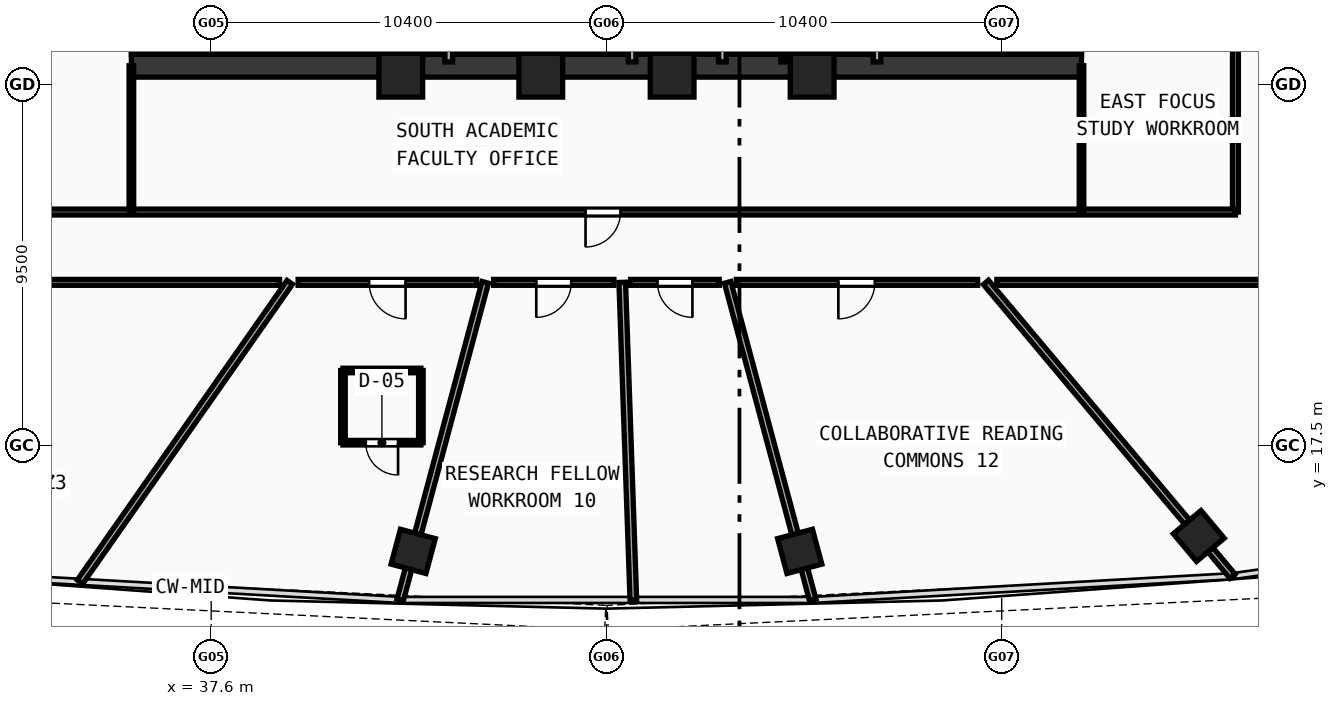
"""IFC4 building model, lengths in metres.
Left out: names, types, materials, properties, quantities, classifications, styles, units other than length and angle.
Written with IfcOpenShell. Run it as: python <this file> out.ifc"""

import sys

from ifc_helpers import new_model, si_unit, direction, frame, frame_2d, origin, origin_with_axes, origin_2d, place, context, subcontext, project, spatial, rectangle, hollow_rectangle, extrude, source, transform, mapped, element, fill, save


model = new_model("IFC4")
c1 = context("Model", 3, precision=1e-05, world=origin(), true_north=direction((0.0, 1.0)))
c2 = subcontext(c1, "Body", "Model", "MODEL_VIEW")
j1 = project(units=[si_unit("LENGTHUNIT", "METRE"), si_unit("PLANEANGLEUNIT", "RADIAN")], contexts=[c1])
p1 = place(None, origin())
s1 = spatial("IfcSite", under=j1, at=p1, CompositionType="ELEMENT")
p2 = place(p1, origin())
s2 = spatial("IfcBuilding", under=s1, at=p2, CompositionType="ELEMENT")
p3 = place(p2, frame((0.0, 0.0, 155.59)))
s3 = spatial("IfcBuildingStorey", under=s2, at=p3, CompositionType="ELEMENT", Elevation=155.59)
p4 = place(p3, frame((35.5, 27.5, 0.0), z_axis=(0.0, 0.0, 1.0), x_axis=(1.0, 0.0, 0.0)))
e1 = element("IfcWall", 1, at=p4, inside=s3, PredefinedType="SHEAR", context=c2, shape_type="SweptSolid", body=[
    extrude(rectangle(XDim=25.0, YDim=0.6, at=frame_2d((12.5, 0.0))), origin(), (0.0, 0.0, 1.0), 3.42),
])
for number, where, z_axis, x_axis in (
    (2, (35.8, 27.8, 0.0), (0.0, 0.0, 1.0), (0.0, 1.0, 0.0)),
    (3, (60.2, 27.8, 0.0), (0.0, 0.0, 1.0), (0.0, 1.0, 0.0)),
):
    element("IfcWall", number, at=place(p3, frame(where, z_axis=z_axis, x_axis=x_axis)), inside=s3, PredefinedType="SHEAR", context=c2, shape_type="SweptSolid", body=[
        extrude(rectangle(XDim=12.1, YDim=0.6, at=frame_2d((6.05, 0.0))), origin(), (0.0, 0.0, 1.0), 3.42),
    ])
p5 = place(p3, frame((39.4, 27.8, 0.0), z_axis=(0.0, 0.0, 1.0), x_axis=(0.0, 1.0, 0.0)))
e4 = element("IfcWall", 4, at=p5, inside=s3, PredefinedType="SHEAR", context=c2, shape_type="SweptSolid", body=[
    extrude(rectangle(XDim=12.1, YDim=0.4, at=frame_2d((6.05, 0.0))), origin(), (0.0, 0.0, 1.0), 3.42),
])
p6 = place(p5, frame((9.95, 0.0, 0.0)))
e5 = element("IfcOpeningElement", 5, at=p6, cuts=e4, PredefinedType="OPENING", context=c2, shape_type="SweptSolid", body=[
    extrude(rectangle(XDim=1.1, YDim=2.1, at=frame_2d((0.55, 1.05))), frame((0.0, 0.21, 0.0), z_axis=(0.0, -1.0, 0.0), x_axis=(1.0, 0.0, 0.0)), (0.0, 0.0, 1.0), 0.42),
])
p7 = place(p3, frame((56.6, 27.8, 0.0), z_axis=(0.0, 0.0, 1.0), x_axis=(0.0, 1.0, 0.0)))
e6 = element("IfcWall", 6, at=p7, inside=s3, PredefinedType="SHEAR", context=c2, shape_type="SweptSolid", body=[
    extrude(rectangle(XDim=12.1, YDim=0.4, at=frame_2d((6.05, 0.0))), origin(), (0.0, 0.0, 1.0), 3.42),
])
p8 = place(p7, frame((9.95, 0.0, 0.0)))
e7 = element("IfcOpeningElement", 7, at=p8, cuts=e6, PredefinedType="OPENING", context=c2, shape_type="SweptSolid", body=[
    extrude(rectangle(XDim=1.1, YDim=2.1, at=frame_2d((0.55, 1.05))), frame((0.0, 0.21, 0.0), z_axis=(0.0, -1.0, 0.0), x_axis=(1.0, 0.0, 0.0)), (0.0, 0.0, 1.0), 0.42),
])
m1 = source(origin(), c2, "Body", "SweptSolid", [
    extrude(hollow_rectangle(XDim=1.15, YDim=1.15, WallThickness=0.048, at=origin_2d()), origin(), (0.0, 0.0, 1.0), 3.68),
])
for number, where, z_axis, x_axis in (
    (8, (42.588, 27.25, -0.26), (0.0, 0.0, 1.0), (1.0, 0.0, 0.0)),
    (9, (46.272, 27.25, -0.26), (0.0, 0.0, 1.0), (1.0, 0.0, 0.0)),
    (10, (49.729, 27.25, -0.26), (0.0, 0.0, 1.0), (1.0, 0.0, 0.0)),
    (11, (53.412, 27.25, -0.26), (0.0, 0.0, 1.0), (1.0, 0.0, 0.0)),
):
    element("IfcColumn", number, at=place(p3, frame(where, z_axis=z_axis, x_axis=x_axis)), inside=s3, PredefinedType="COLUMN", context=c2, shape_type="MappedRepresentation", body=[
        mapped(m1, transform((0.0, 0.0, 0.0), scale=1.0)),
    ])
m2 = source(origin(), c2, "Body", "SweptSolid", [
    extrude(hollow_rectangle(XDim=0.95, YDim=0.95, WallThickness=0.04, at=origin_2d()), origin(), (0.0, 0.0, 1.0), 3.68),
])
for number, where, z_axis, x_axis in (
    (12, (42.915, 14.722, -0.26), (0.0, 0.0, 1.0), (0.966, -0.259, 0.0)),
    (13, (53.085, 14.722, -0.26), (0.0, 0.0, 1.0), (0.966, 0.259, 0.0)),
    (14, (63.585, 15.126, -0.26), (0.0, 0.0, 1.0), (0.766, 0.643, 0.0)),
):
    element("IfcColumn", number, at=place(p3, frame(where, z_axis=z_axis, x_axis=x_axis)), inside=s3, PredefinedType="COLUMN", context=c2, shape_type="MappedRepresentation", body=[
        mapped(m2, transform((0.0, 0.0, 0.0), scale=1.0)),
    ])
p9 = place(p3, frame((43.85, 27.6, 0.0), z_axis=(0.0, 0.0, 1.0), x_axis=(0.0, 1.0, 0.0)))
e15 = element("IfcWall", 15, at=p9, inside=s3, PredefinedType="SOLIDWALL", context=c2, shape_type="SweptSolid", body=[
    extrude(rectangle(XDim=6.22, YDim=0.2, at=frame_2d((3.11, 0.0))), origin(), (0.0, 0.0, 1.0), 3.42),
])
p10 = place(p9, frame((2.25, 0.0, 0.0)))
e16 = element("IfcOpeningElement", 16, at=p10, cuts=e15, PredefinedType="OPENING", context=c2, shape_type="SweptSolid", body=[
    extrude(rectangle(XDim=1.05, YDim=2.1, at=frame_2d((0.525, 1.05))), frame((0.0, 0.11, 0.0), z_axis=(0.0, -1.0, 0.0), x_axis=(1.0, 0.0, 0.0)), (0.0, 0.0, 1.0), 0.22),
])
p11 = place(p3, frame((53.68, 27.6, 0.0), z_axis=(0.0, 0.0, 1.0), x_axis=(0.0, 1.0, 0.0)))
e17 = element("IfcWall", 17, at=p11, inside=s3, PredefinedType="SOLIDWALL", context=c2, shape_type="SweptSolid", body=[
    extrude(rectangle(XDim=9.05, YDim=0.2, at=frame_2d((4.525, 0.0))), origin(), (0.0, 0.0, 1.0), 3.42),
])
p12 = place(p11, frame((6.9, 0.0, 0.0)))
e18 = element("IfcOpeningElement", 18, at=p12, cuts=e17, PredefinedType="OPENING", context=c2, shape_type="SweptSolid", body=[
    extrude(rectangle(XDim=1.05, YDim=2.1, at=frame_2d((0.525, 1.05))), frame((0.0, 0.11, 0.0), z_axis=(0.0, -1.0, 0.0), x_axis=(1.0, 0.0, 0.0)), (0.0, 0.0, 1.0), 0.22),
])
for number, where, z_axis, x_axis in (
    (19, (51.05, 27.6, 0.0), (0.0, 0.0, 1.0), (0.0, 1.0, 0.0)),
    (20, (46.225, 27.6, 0.0), (0.0, 0.0, 1.0), (0.0, 1.0, 0.0)),
    (21, (48.675, 27.6, 0.0), (0.0, 0.0, 1.0), (0.0, 1.0, 0.0)),
    (22, (55.12, 27.6, 0.0), (0.0, 0.0, 1.0), (0.0, 1.0, 0.0)),
):
    element("IfcWall", number, at=place(p3, frame(where, z_axis=z_axis, x_axis=x_axis)), inside=s3, PredefinedType="SOLIDWALL", context=c2, shape_type="SweptSolid", body=[
        extrude(rectangle(XDim=2.12, YDim=0.2, at=frame_2d((1.06, 0.0))), origin(), (0.0, 0.0, 1.0), 3.42),
    ])
p13 = place(p3, frame((42.32, 27.6, 0.0), z_axis=(0.0, 0.0, 1.0), x_axis=(0.0, 1.0, 0.0)))
e23 = element("IfcWall", 23, at=p13, inside=s3, PredefinedType="PARTITIONING", context=c2, shape_type="SweptSolid", body=[
    extrude(rectangle(XDim=5.9, YDim=0.155, at=frame_2d((2.95, 0.0))), origin(), (0.0, 0.0, 1.0), 3.42),
])
p14 = place(p13, frame((1.4, 0.0, 0.0)))
e24 = element("IfcOpeningElement", 24, at=p14, cuts=e23, PredefinedType="OPENING", context=c2, shape_type="SweptSolid", body=[
    extrude(rectangle(XDim=0.9, YDim=2.1, at=frame_2d((0.45, 1.05))), frame((0.0, 0.087, 0.0), z_axis=(0.0, -1.0, 0.0), x_axis=(1.0, 0.0, 0.0)), (0.0, 0.0, 1.0), 0.175),
])
p15 = place(p13, frame((4.45, 0.0, 0.0)))
e25 = element("IfcOpeningElement", 25, at=p15, cuts=e23, PredefinedType="OPENING", context=c2, shape_type="SweptSolid", body=[
    extrude(rectangle(XDim=0.9, YDim=2.1, at=frame_2d((0.45, 1.05))), frame((0.0, 0.087, 0.0), z_axis=(0.0, -1.0, 0.0), x_axis=(1.0, 0.0, 0.0)), (0.0, 0.0, 1.0), 0.175),
])
p16 = place(p3, frame((52.65, 27.6, 0.0), z_axis=(0.0, 0.0, 1.0), x_axis=(0.0, 1.0, 0.0)))
e26 = element("IfcWall", 26, at=p16, inside=s3, PredefinedType="PARTITIONING", context=c2, shape_type="SweptSolid", body=[
    extrude(rectangle(XDim=2.12, YDim=0.12, at=frame_2d((1.06, 0.0))), origin(), (0.0, 0.0, 1.0), 3.42),
])
p17 = place(p3, frame((64.55, 23.65, 0.0), z_axis=(0.0, 0.0, 1.0), x_axis=(0.0, 1.0, 0.0)))
e27 = element("IfcWall", 27, at=p17, inside=s3, PredefinedType="PARTITIONING", context=c2, shape_type="SweptSolid", body=[
    extrude(rectangle(XDim=16.6, YDim=0.155, at=frame_2d((8.3, 0.0))), origin(), (0.0, 0.0, 1.0), 2.77),
])
p18 = place(p17, frame((7.5, 0.0, 0.0)))
e28 = element("IfcOpeningElement", 28, at=p18, cuts=e27, PredefinedType="OPENING", context=c2, shape_type="SweptSolid", body=[
    extrude(rectangle(XDim=0.9, YDim=2.08, at=frame_2d((0.45, 1.04))), frame((0.0, 0.087, 0.0), z_axis=(0.0, -1.0, 0.0), x_axis=(1.0, 0.0, 0.0)), (0.0, 0.0, 1.0), 0.175),
])
p19 = place(p3, frame((31.45, 23.65, 0.0), z_axis=(0.0, 0.0, 1.0), x_axis=(1.0, 0.0, 0.0)))
e29 = element("IfcWall", 29, at=p19, inside=s3, PredefinedType="PARTITIONING", context=c2, shape_type="SweptSolid", body=[
    extrude(rectangle(XDim=33.1, YDim=0.155, at=frame_2d((16.55, 0.0))), origin(), (0.0, 0.0, 1.0), 2.77),
])
p20 = place(p19, frame((16.0, 0.0, 0.0)))
e30 = element("IfcOpeningElement", 30, at=p20, cuts=e29, PredefinedType="OPENING", context=c2, shape_type="SweptSolid", body=[
    extrude(rectangle(XDim=0.92, YDim=2.1, at=frame_2d((0.46, 1.05))), frame((0.0, 0.087, 0.0), z_axis=(0.0, -1.0, 0.0), x_axis=(1.0, 0.0, 0.0)), (0.0, 0.0, 1.0), 0.175),
])
for number, where, z_axis, x_axis in (
    (31, (35.5, 23.65, 0.0), (0.0, 0.0, 1.0), (0.0, 1.0, 0.0)),
    (32, (60.5, 23.65, 0.0), (0.0, 0.0, 1.0), (0.0, 1.0, 0.0)),
):
    element("IfcWall", number, at=place(p3, frame(where, z_axis=z_axis, x_axis=x_axis)), inside=s3, PredefinedType="PARTITIONING", context=c2, shape_type="SweptSolid", body=[
        extrude(rectangle(XDim=3.85, YDim=0.12, at=frame_2d((1.925, 0.0))), origin(), (0.0, 0.0, 1.0), 3.02),
    ])
p21 = place(p3, frame((39.667, 21.8, 0.0), z_axis=(0.0, 0.0, 1.0), x_axis=(-0.573578164834, -0.81915083399, 0.0)))
e33 = element("IfcWall", 33, at=p21, inside=s3, PredefinedType="PARTITIONING", context=c2, shape_type="SweptSolid", body=[
    extrude(rectangle(XDim=9.62, YDim=0.175, at=frame_2d((4.81, 0.0))), origin(), (0.0, 0.0, 1.0), 2.77),
])
p22 = place(p3, frame((44.811, 21.8, 0.0), z_axis=(0.0, 0.0, 1.0), x_axis=(-0.258790159725, -0.96593356564, 0.0)))
e34 = element("IfcWall", 34, at=p22, inside=s3, PredefinedType="PARTITIONING", context=c2, shape_type="SweptSolid", body=[
    extrude(rectangle(XDim=8.651, YDim=0.175, at=frame_2d((4.325, 0.0))), origin(), (0.0, 0.0, 1.0), 2.77),
])
p23 = place(p3, frame((48.416, 21.8, 0.0), z_axis=(0.0, 0.0, 1.0), x_axis=(0.034921859784, -0.999390045833, 0.0)))
e35 = element("IfcWall", 35, at=p23, inside=s3, PredefinedType="PARTITIONING", context=c2, shape_type="SweptSolid", body=[
    extrude(rectangle(XDim=8.361, YDim=0.175, at=frame_2d((4.181, 0.0))), origin(), (0.0, 0.0, 1.0), 2.77),
])
p24 = place(p3, frame((51.189, 21.8, 0.0), z_axis=(0.0, 0.0, 1.0), x_axis=(0.258790159725, -0.96593356564, 0.0)))
e36 = element("IfcWall", 36, at=p24, inside=s3, PredefinedType="PARTITIONING", context=c2, shape_type="SweptSolid", body=[
    extrude(rectangle(XDim=8.651, YDim=0.175, at=frame_2d((4.325, 0.0))), origin(), (0.0, 0.0, 1.0), 2.77),
])
p25 = place(p3, frame((57.985, 21.8, 0.0), z_axis=(0.0, 0.0, 1.0), x_axis=(0.642793186641, -0.766039763464, 0.0)))
e37 = element("IfcWall", 37, at=p25, inside=s3, PredefinedType="PARTITIONING", context=c2, shape_type="SweptSolid", body=[
    extrude(rectangle(XDim=10.093, YDim=0.175, at=frame_2d((5.046, 0.0))), origin(), (0.0, 0.0, 1.0), 2.77),
])
p26 = place(p3, frame((66.4, 21.8, 0.0), z_axis=(0.0, 0.0, 1.0), x_axis=(-1.0, 0.0, 0.0)))
e38 = element("IfcWall", 38, at=p26, inside=s3, PredefinedType="PARTITIONING", context=c2, shape_type="SweptSolid", body=[
    extrude(rectangle(XDim=8.127, YDim=0.155, at=frame_2d((4.064, 0.0))), origin(), (0.0, 0.0, 1.0), 3.02),
])
p27 = place(p3, frame((57.765, 21.8, 0.0), z_axis=(0.0, 0.0, 1.0), x_axis=(-1.0, 0.0, 0.0)))
e39 = element("IfcWall", 39, at=p27, inside=s3, PredefinedType="PARTITIONING", context=c2, shape_type="SweptSolid", body=[
    extrude(rectangle(XDim=6.349, YDim=0.155, at=frame_2d((3.174, 0.0))), origin(), (0.0, 0.0, 1.0), 2.77),
])
p28 = place(p27, frame((2.703, 0.0, 0.0)))
e40 = element("IfcOpeningElement", 40, at=p28, cuts=e39, PredefinedType="OPENING", context=c2, shape_type="SweptSolid", body=[
    extrude(rectangle(XDim=0.96, YDim=2.12, at=frame_2d((0.48, 1.06))), frame((0.0, 0.087, 0.0), z_axis=(0.0, -1.0, 0.0), x_axis=(1.0, 0.0, 0.0)), (0.0, 0.0, 1.0), 0.175),
])
p29 = place(p3, frame((50.969, 21.8, 0.0), z_axis=(0.0, 0.0, 1.0), x_axis=(-1.0, 0.0, 0.0)))
e41 = element("IfcWall", 41, at=p29, inside=s3, PredefinedType="PARTITIONING", context=c2, shape_type="SweptSolid", body=[
    extrude(rectangle(XDim=2.333, YDim=0.155, at=frame_2d((1.167, 0.0))), origin(), (0.0, 0.0, 1.0), 3.42),
])
p30 = place(p29, frame((0.707, 0.0, 0.0)))
e42 = element("IfcOpeningElement", 42, at=p30, cuts=e41, PredefinedType="OPENING", context=c2, shape_type="SweptSolid", body=[
    extrude(rectangle(XDim=0.92, YDim=2.1, at=frame_2d((0.46, 1.05))), frame((0.0, 0.087, 0.0), z_axis=(0.0, -1.0, 0.0), x_axis=(1.0, 0.0, 0.0)), (0.0, 0.0, 1.0), 0.175),
])
p31 = place(p3, frame((48.196, 21.8, 0.0), z_axis=(0.0, 0.0, 1.0), x_axis=(-1.0, 0.0, 0.0)))
e43 = element("IfcWall", 43, at=p31, inside=s3, PredefinedType="PARTITIONING", context=c2, shape_type="SweptSolid", body=[
    extrude(rectangle(XDim=3.165, YDim=0.155, at=frame_2d((1.582, 0.0))), origin(), (0.0, 0.0, 1.0), 3.42),
])
p32 = place(p31, frame((1.122, 0.0, 0.0)))
e44 = element("IfcOpeningElement", 44, at=p32, cuts=e43, PredefinedType="OPENING", context=c2, shape_type="SweptSolid", body=[
    extrude(rectangle(XDim=0.92, YDim=2.1, at=frame_2d((0.46, 1.05))), frame((0.0, 0.087, 0.0), z_axis=(0.0, -1.0, 0.0), x_axis=(1.0, 0.0, 0.0)), (0.0, 0.0, 1.0), 0.175),
])
p33 = place(p3, frame((44.583, 21.8, 0.0), z_axis=(0.0, 0.0, 1.0), x_axis=(-1.0, 0.0, 0.0)))
e45 = element("IfcWall", 45, at=p33, inside=s3, PredefinedType="PARTITIONING", context=c2, shape_type="SweptSolid", body=[
    extrude(rectangle(XDim=4.696, YDim=0.155, at=frame_2d((2.348, 0.0))), origin(), (0.0, 0.0, 1.0), 3.42),
])
p34 = place(p33, frame((1.869, 0.0, 0.0)))
e46 = element("IfcOpeningElement", 46, at=p34, cuts=e45, PredefinedType="OPENING", context=c2, shape_type="SweptSolid", body=[
    extrude(rectangle(XDim=0.96, YDim=2.12, at=frame_2d((0.48, 1.06))), frame((0.0, 0.087, 0.0), z_axis=(0.0, -1.0, 0.0), x_axis=(1.0, 0.0, 0.0)), (0.0, 0.0, 1.0), 0.175),
])
p35 = place(p3, frame((39.399, 21.8, 0.0), z_axis=(0.0, 0.0, 1.0), x_axis=(-1.0, 0.0, 0.0)))
e47 = element("IfcWall", 47, at=p35, inside=s3, PredefinedType="PARTITIONING", context=c2, shape_type="SweptSolid", body=[
    extrude(rectangle(XDim=9.799, YDim=0.155, at=frame_2d((4.899, 0.0))), origin(), (0.0, 0.0, 1.0), 2.77),
])
p36 = place(p3, frame((41.067, 17.581, 0.0), z_axis=(0.0, 0.0, 1.0), x_axis=(1.0, 0.0, 0.0)))
e48 = element("IfcWall", 48, at=p36, inside=s3, PredefinedType="PARTITIONING", context=c2, shape_type="SweptSolid", body=[
    extrude(rectangle(XDim=2.05, YDim=0.12, at=frame_2d((1.025, 0.0))), origin(), (0.0, 0.0, 1.0), 3.42),
])
p37 = place(p36, frame((0.6, 0.0, 0.0)))
e49 = element("IfcOpeningElement", 49, at=p37, cuts=e48, PredefinedType="OPENING", context=c2, shape_type="SweptSolid", body=[
    extrude(rectangle(XDim=0.85, YDim=2.1, at=frame_2d((0.425, 1.05))), frame((0.0, 0.07, 0.0), z_axis=(0.0, -1.0, 0.0), x_axis=(1.0, 0.0, 0.0)), (0.0, 0.0, 1.0), 0.14),
])
p38 = place(p3, frame((43.117, 17.581, 0.0), z_axis=(0.0, 0.0, 1.0), x_axis=(0.0, 1.0, 0.0)))
e50 = element("IfcWall", 50, at=p38, inside=s3, PredefinedType="PARTITIONING", context=c2, shape_type="SweptSolid", body=[
    extrude(rectangle(XDim=1.9, YDim=0.12, at=frame_2d((0.95, 0.0))), origin(), (0.0, 0.0, 1.0), 3.02),
])
p39 = place(p3, frame((43.117, 19.481, 0.0), z_axis=(0.0, 0.0, 1.0), x_axis=(-1.0, 0.0, 0.0)))
e51 = element("IfcWall", 51, at=p39, inside=s3, PredefinedType="PARTITIONING", context=c2, shape_type="SweptSolid", body=[
    extrude(rectangle(XDim=2.05, YDim=0.12, at=frame_2d((1.025, 0.0))), origin(), (0.0, 0.0, 1.0), 3.42),
])
p40 = place(p3, frame((41.067, 19.481, 0.0), z_axis=(0.0, 0.0, 1.0), x_axis=(0.0, -1.0, 0.0)))
e52 = element("IfcWall", 52, at=p40, inside=s3, PredefinedType="PARTITIONING", context=c2, shape_type="SweptSolid", body=[
    extrude(rectangle(XDim=1.9, YDim=0.12, at=frame_2d((0.95, 0.0))), origin(), (0.0, 0.0, 1.0), 3.02),
])
m3 = source(origin(), c2, "Body", "SweptSolid", [
    extrude(rectangle(XDim=0.92, YDim=2.1, at=frame_2d((0.46, 1.05))), frame((0.0, 0.025, 0.0), z_axis=(0.0, -1.0, 0.0), x_axis=(1.0, 0.0, 0.0)), (0.0, 0.0, 1.0), 0.05),
])
p41 = place(p20, frame((0.92, 0.0, 0.0), z_axis=(0.0, 0.0, 1.0), x_axis=(-1.0, 0.0, 0.0)))
e53 = element("IfcDoor", 53, at=p41, inside=s3, OperationType="SINGLE_SWING_RIGHT", PredefinedType="DOOR", context=c2, shape_type="MappedRepresentation", body=[
    mapped(m3, transform((0.0, 0.0, 0.0), scale=1.0)),
])
fill(e30, e53)
m4 = source(origin(), c2, "Body", "SweptSolid", [
    extrude(rectangle(XDim=0.96, YDim=2.12, at=frame_2d((0.48, 1.06))), frame((0.0, 0.025, 0.0), z_axis=(0.0, -1.0, 0.0), x_axis=(1.0, 0.0, 0.0)), (0.0, 0.0, 1.0), 0.05),
])
p42 = place(p34, origin_with_axes())
e54 = element("IfcDoor", 54, at=p42, inside=s3, OperationType="SINGLE_SWING_LEFT", PredefinedType="DOOR", context=c2, shape_type="MappedRepresentation", body=[
    mapped(m4, transform((0.0, 0.0, 0.0), scale=1.0)),
])
fill(e46, e54)
m5 = source(origin(), c2, "Body", "SweptSolid", [
    extrude(rectangle(XDim=0.85, YDim=2.1, at=frame_2d((0.425, 1.05))), frame((0.0, 0.025, 0.0), z_axis=(0.0, -1.0, 0.0), x_axis=(1.0, 0.0, 0.0)), (0.0, 0.0, 1.0), 0.05),
])
p43 = place(p37, frame((0.85, 0.0, 0.0), z_axis=(0.0, 0.0, 1.0), x_axis=(-1.0, 0.0, 0.0)))
e55 = element("IfcDoor", 55, at=p43, inside=s3, OperationType="SINGLE_SWING_LEFT", PredefinedType="DOOR", context=c2, shape_type="MappedRepresentation", body=[
    mapped(m5, transform((0.0, 0.0, 0.0), scale=1.0)),
])
fill(e49, e55)
p44 = place(p32, origin_with_axes())
e56 = element("IfcDoor", 56, at=p44, inside=s3, OperationType="SINGLE_SWING_RIGHT", PredefinedType="DOOR", context=c2, shape_type="MappedRepresentation", body=[
    mapped(m3, transform((0.0, 0.0, 0.0), scale=1.0)),
])
fill(e44, e56)
p45 = place(p30, origin_with_axes())
e57 = element("IfcDoor", 57, at=p45, inside=s3, OperationType="SINGLE_SWING_LEFT", PredefinedType="DOOR", context=c2, shape_type="MappedRepresentation", body=[
    mapped(m3, transform((0.0, 0.0, 0.0), scale=1.0)),
])
fill(e42, e57)
p46 = place(p28, origin_with_axes())
e58 = element("IfcDoor", 58, at=p46, inside=s3, OperationType="SINGLE_SWING_RIGHT", PredefinedType="DOOR", context=c2, shape_type="MappedRepresentation", body=[
    mapped(m4, transform((0.0, 0.0, 0.0), scale=1.0)),
])
fill(e40, e58)
save(model, sys.argv[1])
